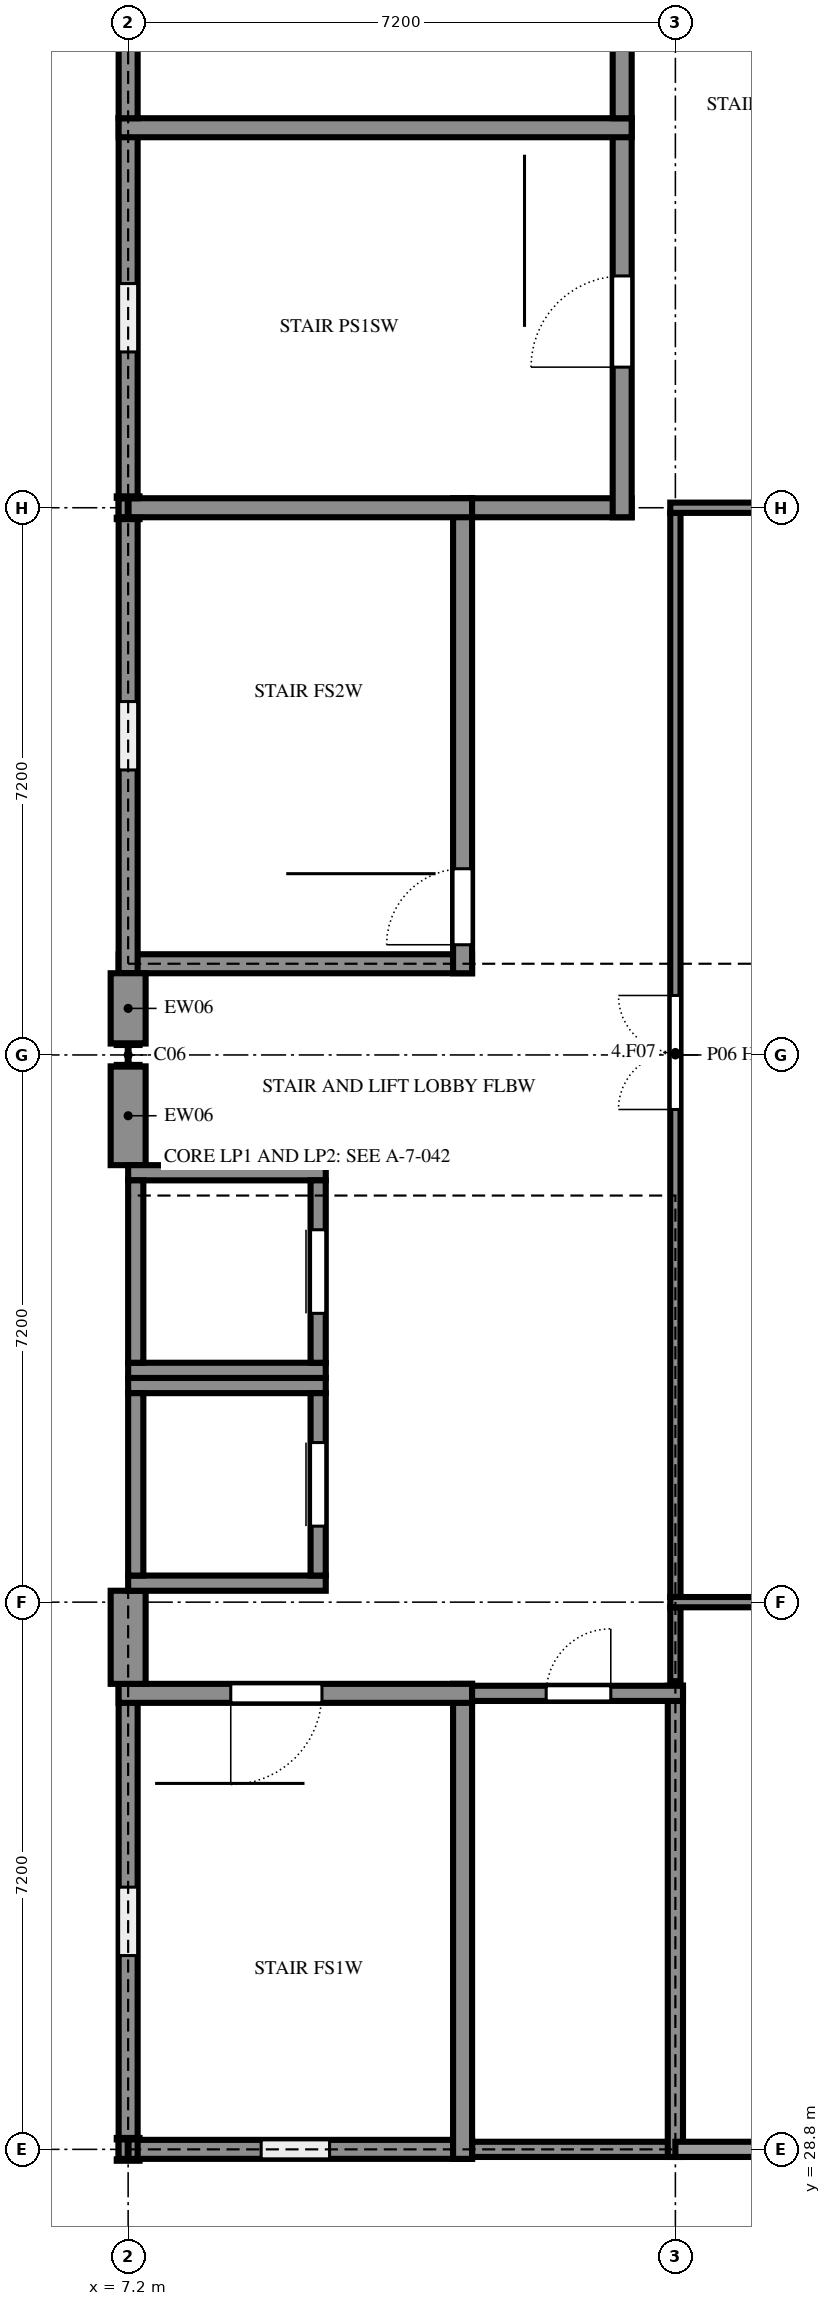
"""IFC4 building model, lengths in metres.
Left out: names, types, materials, properties, quantities, classifications, styles, units other than length and angle.
Written with IfcOpenShell. Run it as: python <this file> out.ifc"""

import sys

from ifc_helpers import new_model, si_unit, direction, frame, frame_2d, origin, origin_2d, place, context, subcontext, project, spatial, rectangle, i_section, extrude, element, fill, save


model = new_model("IFC4")
c1 = context("Model", 3, precision=1e-05, world=origin(), true_north=direction((0.0, 1.0)))
c2 = subcontext(c1, "Body", "Model", "MODEL_VIEW")
j1 = project(units=[si_unit("LENGTHUNIT", "METRE"), si_unit("PLANEANGLEUNIT", "RADIAN")], contexts=[c1])
p1 = place(None, origin())
s1 = spatial("IfcSite", under=j1, at=p1, CompositionType="ELEMENT")
p2 = place(p1, origin())
s2 = spatial("IfcBuilding", under=s1, at=p2, CompositionType="ELEMENT")
p3 = place(p2, frame((0.0, 0.0, 14.4)))
s3 = spatial("IfcBuildingStorey", under=s2, at=p3, CompositionType="ELEMENT", Elevation=14.4)
for number, where, z_axis, x_axis in (
    (1, (7.2, 28.8, 0.0), (0.0, 0.0, 1.0), (1.0, 0.0, 0.0)),
    (2, (7.2, 43.2, 0.0), (0.0, 0.0, 1.0), (1.0, 0.0, 0.0)),
    (3, (7.2, 50.4, 0.0), (0.0, 0.0, 1.0), (1.0, 0.0, 0.0)),
):
    element("IfcColumn", number, at=place(p3, frame(where, z_axis=z_axis, x_axis=x_axis)), inside=s3, PredefinedType="COLUMN", context=c2, shape_type="SweptSolid", body=[
        extrude(i_section(OverallWidth=0.3, OverallDepth=0.3, WebThickness=0.011, FlangeThickness=0.019, FilletRadius=0.027, at=origin_2d()), origin(), (0.0, 0.0, 1.0), 3.6),
    ])
p4 = place(p3, frame((7.075, 28.8, 0.0), z_axis=(0.0, 0.0, 1.0), x_axis=(1.0, 0.0, 0.0)))
e4 = element("IfcWall", 4, at=p4, inside=s3, PredefinedType="SHEAR", context=c2, shape_type="SweptSolid", body=[
    extrude(rectangle(XDim=4.65, YDim=0.25, at=frame_2d((2.325, 0.0))), origin(), (0.0, 0.0, 1.0), 3.6),
])
p5 = place(p4, frame((1.875, 0.0, 0.6)))
e5 = element("IfcOpeningElement", 5, at=p5, cuts=e4, PredefinedType="OPENING", context=c2, shape_type="SweptSolid", body=[
    extrude(rectangle(XDim=0.9, YDim=2.1, at=frame_2d((0.45, 1.05))), frame((0.0, 0.135, 0.0), z_axis=(0.0, -1.0, 0.0), x_axis=(1.0, 0.0, 0.0)), (0.0, 0.0, 1.0), 0.27),
])
p6 = place(p3, frame((11.725, 28.8, 0.0), z_axis=(0.0, 0.0, 1.0), x_axis=(1.0, 0.0, 0.0)))
e6 = element("IfcWall", 6, at=p6, inside=s3, PredefinedType="SHEAR", context=c2, shape_type="SweptSolid", body=[
    extrude(rectangle(XDim=2.775, YDim=0.2, at=frame_2d((1.387, 0.0))), origin(), (0.0, 0.0, 1.0), 3.6),
])
p7 = place(p3, frame((11.6, 28.675, 0.0), z_axis=(0.0, 0.0, 1.0), x_axis=(0.0, 1.0, 0.0)))
e7 = element("IfcWall", 7, at=p7, inside=s3, PredefinedType="SHEAR", context=c2, shape_type="SweptSolid", body=[
    extrude(rectangle(XDim=6.25, YDim=0.25, at=frame_2d((3.125, 0.0))), origin(), (0.0, 0.0, 1.0), 3.6),
])
p8 = place(p3, frame((14.4, 28.7, 0.0), z_axis=(0.0, 0.0, 1.0), x_axis=(0.0, 1.0, 0.0)))
e8 = element("IfcWall", 8, at=p8, inside=s3, PredefinedType="SHEAR", context=c2, shape_type="SweptSolid", body=[
    extrude(rectangle(XDim=6.2, YDim=0.2, at=frame_2d((3.1, 0.0))), origin(), (0.0, 0.0, 1.0), 3.6),
])
p9 = place(p3, frame((7.2, 34.925, 0.0), z_axis=(0.0, 0.0, 1.0), x_axis=(0.0, -1.0, 0.0)))
e9 = element("IfcWall", 9, at=p9, inside=s3, PredefinedType="SHEAR", context=c2, shape_type="SweptSolid", body=[
    extrude(rectangle(XDim=6.25, YDim=0.25, at=frame_2d((3.125, 0.0))), origin(), (0.0, 0.0, 1.0), 3.6),
])
p10 = place(p9, frame((2.675, 0.0, 0.6)))
e10 = element("IfcOpeningElement", 10, at=p10, cuts=e9, PredefinedType="OPENING", context=c2, shape_type="SweptSolid", body=[
    extrude(rectangle(XDim=0.9, YDim=2.1, at=frame_2d((0.45, 1.05))), frame((0.0, 0.135, 0.0), z_axis=(0.0, -1.0, 0.0), x_axis=(1.0, 0.0, 0.0)), (0.0, 0.0, 1.0), 0.27),
])
p11 = place(p3, frame((11.725, 34.8, 0.0), z_axis=(0.0, 0.0, 1.0), x_axis=(-1.0, 0.0, 0.0)))
e11 = element("IfcWall", 11, at=p11, inside=s3, PredefinedType="SHEAR", context=c2, shape_type="SweptSolid", body=[
    extrude(rectangle(XDim=4.65, YDim=0.25, at=frame_2d((2.325, 0.0))), origin(), (0.0, 0.0, 1.0), 3.6),
])
p12 = place(p11, frame((1.975, 0.0, 0.0)))
e12 = element("IfcOpeningElement", 12, at=p12, cuts=e11, PredefinedType="OPENING", context=c2, shape_type="SweptSolid", body=[
    extrude(rectangle(XDim=1.2, YDim=2.4, at=frame_2d((0.6, 1.2))), frame((0.0, 0.135, 0.0), z_axis=(0.0, -1.0, 0.0), x_axis=(1.0, 0.0, 0.0)), (0.0, 0.0, 1.0), 0.27),
])
p13 = place(p3, frame((14.5, 34.8, 0.0), z_axis=(0.0, 0.0, 1.0), x_axis=(-1.0, 0.0, 0.0)))
e13 = element("IfcWall", 13, at=p13, inside=s3, PredefinedType="SHEAR", context=c2, shape_type="SweptSolid", body=[
    extrude(rectangle(XDim=2.775, YDim=0.2, at=frame_2d((1.387, 0.0))), origin(), (0.0, 0.0, 1.0), 3.6),
])
p14 = place(p13, frame((0.95, 0.0, 0.0)))
e14 = element("IfcOpeningElement", 14, at=p14, cuts=e13, PredefinedType="OPENING", context=c2, shape_type="SweptSolid", body=[
    extrude(rectangle(XDim=0.85, YDim=2.1, at=frame_2d((0.425, 1.05))), frame((0.0, 0.11, 0.0), z_axis=(0.0, -1.0, 0.0), x_axis=(1.0, 0.0, 0.0)), (0.0, 0.0, 1.0), 0.22),
])
p15 = place(p3, frame((7.075, 44.4, 0.0), z_axis=(0.0, 0.0, 1.0), x_axis=(1.0, 0.0, 0.0)))
e15 = element("IfcWall", 15, at=p15, inside=s3, PredefinedType="SHEAR", context=c2, shape_type="SweptSolid", body=[
    extrude(rectangle(XDim=4.65, YDim=0.25, at=frame_2d((2.325, 0.0))), origin(), (0.0, 0.0, 1.0), 3.6),
])
p16 = place(p3, frame((11.6, 44.275, 0.0), z_axis=(0.0, 0.0, 1.0), x_axis=(0.0, 1.0, 0.0)))
e16 = element("IfcWall", 16, at=p16, inside=s3, PredefinedType="SHEAR", context=c2, shape_type="SweptSolid", body=[
    extrude(rectangle(XDim=6.25, YDim=0.25, at=frame_2d((3.125, 0.0))), origin(), (0.0, 0.0, 1.0), 3.6),
])
p17 = place(p16, frame((0.375, 0.0, 0.0)))
e17 = element("IfcOpeningElement", 17, at=p17, cuts=e16, PredefinedType="OPENING", context=c2, shape_type="SweptSolid", body=[
    extrude(rectangle(XDim=1.0, YDim=2.4, at=frame_2d((0.5, 1.2))), frame((0.0, 0.135, 0.0), z_axis=(0.0, -1.0, 0.0), x_axis=(1.0, 0.0, 0.0)), (0.0, 0.0, 1.0), 0.27),
])
p18 = place(p3, frame((7.2, 50.525, 0.0), z_axis=(0.0, 0.0, 1.0), x_axis=(0.0, -1.0, 0.0)))
e18 = element("IfcWall", 18, at=p18, inside=s3, PredefinedType="SHEAR", context=c2, shape_type="SweptSolid", body=[
    extrude(rectangle(XDim=6.25, YDim=0.25, at=frame_2d((3.125, 0.0))), origin(), (0.0, 0.0, 1.0), 3.6),
])
p19 = place(p18, frame((2.675, 0.0, 0.6)))
e19 = element("IfcOpeningElement", 19, at=p19, cuts=e18, PredefinedType="OPENING", context=c2, shape_type="SweptSolid", body=[
    extrude(rectangle(XDim=0.9, YDim=2.1, at=frame_2d((0.45, 1.05))), frame((0.0, 0.135, 0.0), z_axis=(0.0, -1.0, 0.0), x_axis=(1.0, 0.0, 0.0)), (0.0, 0.0, 1.0), 0.27),
])
p20 = place(p3, frame((11.725, 50.4, 0.0), z_axis=(0.0, 0.0, 1.0), x_axis=(-1.0, 0.0, 0.0)))
e20 = element("IfcWall", 20, at=p20, inside=s3, PredefinedType="SHEAR", context=c2, shape_type="SweptSolid", body=[
    extrude(rectangle(XDim=4.65, YDim=0.25, at=frame_2d((2.325, 0.0))), origin(), (0.0, 0.0, 1.0), 3.6),
])
p21 = place(p3, frame((11.725, 50.4, 0.0), z_axis=(0.0, 0.0, 1.0), x_axis=(1.0, 0.0, 0.0)))
e21 = element("IfcWall", 21, at=p21, inside=s3, PredefinedType="SHEAR", context=c2, shape_type="SweptSolid", body=[
    extrude(rectangle(XDim=2.1, YDim=0.25, at=frame_2d((1.05, 0.0))), origin(), (0.0, 0.0, 1.0), 3.6),
])
p22 = place(p3, frame((13.7, 50.275, 0.0), z_axis=(0.0, 0.0, 1.0), x_axis=(0.0, 1.0, 0.0)))
e22 = element("IfcWall", 22, at=p22, inside=s3, PredefinedType="SHEAR", context=c2, shape_type="SweptSolid", body=[
    extrude(rectangle(XDim=5.25, YDim=0.25, at=frame_2d((2.625, 0.0))), origin(), (0.0, 0.0, 1.0), 3.6),
])
p23 = place(p22, frame((1.975, 0.0, 0.0)))
e23 = element("IfcOpeningElement", 23, at=p23, cuts=e22, PredefinedType="OPENING", context=c2, shape_type="SweptSolid", body=[
    extrude(rectangle(XDim=1.2, YDim=2.4, at=frame_2d((0.6, 1.2))), frame((0.0, 0.135, 0.0), z_axis=(0.0, -1.0, 0.0), x_axis=(1.0, 0.0, 0.0)), (0.0, 0.0, 1.0), 0.27),
])
p24 = place(p3, frame((7.2, 55.525, 0.0), z_axis=(0.0, 0.0, 1.0), x_axis=(0.0, -1.0, 0.0)))
e24 = element("IfcWall", 24, at=p24, inside=s3, PredefinedType="SHEAR", context=c2, shape_type="SweptSolid", body=[
    extrude(rectangle(XDim=5.0, YDim=0.25, at=frame_2d((2.5, 0.0))), origin(), (0.0, 0.0, 1.0), 3.6),
])
p25 = place(p24, frame((2.175, 0.0, 0.6)))
e25 = element("IfcOpeningElement", 25, at=p25, cuts=e24, PredefinedType="OPENING", context=c2, shape_type="SweptSolid", body=[
    extrude(rectangle(XDim=0.9, YDim=2.1, at=frame_2d((0.45, 1.05))), frame((0.0, 0.135, 0.0), z_axis=(0.0, -1.0, 0.0), x_axis=(1.0, 0.0, 0.0)), (0.0, 0.0, 1.0), 0.27),
])
p26 = place(p3, frame((13.825, 55.4, 0.0), z_axis=(0.0, 0.0, 1.0), x_axis=(-1.0, 0.0, 0.0)))
e26 = element("IfcWall", 26, at=p26, inside=s3, PredefinedType="SHEAR", context=c2, shape_type="SweptSolid", body=[
    extrude(rectangle(XDim=6.75, YDim=0.25, at=frame_2d((3.375, 0.0))), origin(), (0.0, 0.0, 1.0), 3.6),
])
p27 = place(p3, frame((13.7, 55.525, 0.0), z_axis=(0.0, 0.0, 1.0), x_axis=(0.0, 1.0, 0.0)))
e27 = element("IfcWall", 27, at=p27, inside=s3, PredefinedType="SHEAR", context=c2, shape_type="SweptSolid", body=[
    extrude(rectangle(XDim=5.0, YDim=0.25, at=frame_2d((2.5, 0.0))), origin(), (0.0, 0.0, 1.0), 3.6),
])
p28 = place(p3, frame((7.2, 60.525, 0.0), z_axis=(0.0, 0.0, 1.0), x_axis=(0.0, -1.0, 0.0)))
e28 = element("IfcWall", 28, at=p28, inside=s3, PredefinedType="SHEAR", context=c2, shape_type="SweptSolid", body=[
    extrude(rectangle(XDim=5.0, YDim=0.25, at=frame_2d((2.5, 0.0))), origin(), (0.0, 0.0, 1.0), 3.6),
])
p29 = place(p28, frame((2.175, 0.0, 0.6)))
e29 = element("IfcOpeningElement", 29, at=p29, cuts=e28, PredefinedType="OPENING", context=c2, shape_type="SweptSolid", body=[
    extrude(rectangle(XDim=0.9, YDim=2.1, at=frame_2d((0.45, 1.05))), frame((0.0, 0.135, 0.0), z_axis=(0.0, -1.0, 0.0), x_axis=(1.0, 0.0, 0.0)), (0.0, 0.0, 1.0), 0.27),
])
p30 = place(p3, frame((7.2, 44.275, 0.0), z_axis=(0.0, 0.0, 1.0), x_axis=(0.0, -1.0, 0.0)))
e30 = element("IfcWall", 30, at=p30, inside=s3, PredefinedType="SOLIDWALL", context=c2, shape_type="SweptSolid", body=[
    extrude(rectangle(XDim=0.925, YDim=0.46, at=frame_2d((0.462, 0.0))), origin(), (0.0, 0.0, 1.0), 3.22),
])
p31 = place(p3, frame((7.2, 43.05, 0.0), z_axis=(0.0, 0.0, 1.0), x_axis=(0.0, -1.0, 0.0)))
e31 = element("IfcWall", 31, at=p31, inside=s3, PredefinedType="SOLIDWALL", context=c2, shape_type="SweptSolid", body=[
    extrude(rectangle(XDim=1.3, YDim=0.46, at=frame_2d((0.65, 0.0))), origin(), (0.0, 0.0, 1.0), 3.22),
])
p32 = place(p3, frame((7.2, 36.15, 0.0), z_axis=(0.0, 0.0, 1.0), x_axis=(0.0, -1.0, 0.0)))
e32 = element("IfcWall", 32, at=p32, inside=s3, PredefinedType="SOLIDWALL", context=c2, shape_type="SweptSolid", body=[
    extrude(rectangle(XDim=1.225, YDim=0.46, at=frame_2d((0.612, 0.0))), origin(), (0.0, 0.0, 1.0), 3.22),
])
for number, where, z_axis, x_axis in (
    (33, (7.2, 36.25, 0.0), (0.0, 0.0, 1.0), (1.0, 0.0, 0.0)),
    (34, (7.2, 38.85, 0.0), (0.0, 0.0, 1.0), (1.0, 0.0, 0.0)),
):
    element("IfcWall", number, at=place(p3, frame(where, z_axis=z_axis, x_axis=x_axis)), inside=s3, PredefinedType="SHEAR", context=c2, shape_type="SweptSolid", body=[
        extrude(rectangle(XDim=2.6, YDim=0.2, at=frame_2d((1.3, 0.0))), origin(), (0.0, 0.0, 1.0), 4.5),
    ])
p33 = place(p3, frame((7.3, 36.35, 0.0), z_axis=(0.0, 0.0, 1.0), x_axis=(0.0, 1.0, 0.0)))
e35 = element("IfcWall", 35, at=p33, inside=s3, PredefinedType="SHEAR", context=c2, shape_type="SweptSolid", body=[
    extrude(rectangle(XDim=2.4, YDim=0.2, at=frame_2d((1.2, 0.0))), origin(), (0.0, 0.0, 1.0), 4.5),
])
p34 = place(p3, frame((9.7, 36.35, 0.0), z_axis=(0.0, 0.0, 1.0), x_axis=(0.0, 1.0, 0.0)))
e36 = element("IfcWall", 36, at=p34, inside=s3, PredefinedType="SHEAR", context=c2, shape_type="SweptSolid", body=[
    extrude(rectangle(XDim=2.4, YDim=0.2, at=frame_2d((1.2, 0.0))), origin(), (0.0, 0.0, 1.0), 4.5),
])
p35 = place(p34, frame((0.65, 0.0, 0.0)))
e37 = element("IfcOpeningElement", 37, at=p35, cuts=e36, PredefinedType="OPENING", context=c2, shape_type="SweptSolid", body=[
    extrude(rectangle(XDim=1.1, YDim=2.1, at=frame_2d((0.55, 1.05))), frame((0.0, 0.11, 0.0), z_axis=(0.0, -1.0, 0.0), x_axis=(1.0, 0.0, 0.0)), (0.0, 0.0, 1.0), 0.22),
])
for number, where, z_axis, x_axis in (
    (38, (7.2, 39.05, 0.0), (0.0, 0.0, 1.0), (1.0, 0.0, 0.0)),
    (39, (7.2, 41.65, 0.0), (0.0, 0.0, 1.0), (1.0, 0.0, 0.0)),
):
    element("IfcWall", number, at=place(p3, frame(where, z_axis=z_axis, x_axis=x_axis)), inside=s3, PredefinedType="SHEAR", context=c2, shape_type="SweptSolid", body=[
        extrude(rectangle(XDim=2.6, YDim=0.2, at=frame_2d((1.3, 0.0))), origin(), (0.0, 0.0, 1.0), 4.5),
    ])
p36 = place(p3, frame((7.3, 39.15, 0.0), z_axis=(0.0, 0.0, 1.0), x_axis=(0.0, 1.0, 0.0)))
e40 = element("IfcWall", 40, at=p36, inside=s3, PredefinedType="SHEAR", context=c2, shape_type="SweptSolid", body=[
    extrude(rectangle(XDim=2.4, YDim=0.2, at=frame_2d((1.2, 0.0))), origin(), (0.0, 0.0, 1.0), 4.5),
])
p37 = place(p3, frame((9.7, 39.15, 0.0), z_axis=(0.0, 0.0, 1.0), x_axis=(0.0, 1.0, 0.0)))
e41 = element("IfcWall", 41, at=p37, inside=s3, PredefinedType="SHEAR", context=c2, shape_type="SweptSolid", body=[
    extrude(rectangle(XDim=2.4, YDim=0.2, at=frame_2d((1.2, 0.0))), origin(), (0.0, 0.0, 1.0), 4.5),
])
p38 = place(p37, frame((0.65, 0.0, 0.0)))
e42 = element("IfcOpeningElement", 42, at=p38, cuts=e41, PredefinedType="OPENING", context=c2, shape_type="SweptSolid", body=[
    extrude(rectangle(XDim=1.1, YDim=2.1, at=frame_2d((0.55, 1.05))), frame((0.0, 0.11, 0.0), z_axis=(0.0, -1.0, 0.0), x_axis=(1.0, 0.0, 0.0)), (0.0, 0.0, 1.0), 0.22),
])
p39 = place(p3, frame((14.4, 50.333, 0.0), z_axis=(0.0, 0.0, 1.0), x_axis=(0.0, -1.0, 0.0)))
e43 = element("IfcWall", 43, at=p39, inside=s3, PredefinedType="PARTITIONING", context=c2, shape_type="SweptSolid", body=[
    extrude(rectangle(XDim=14.265, YDim=0.135, at=frame_2d((7.133, 0.0))), origin(), (0.0, 0.0, 1.0), 3.12),
])
p40 = place(p39, frame((6.35, 0.0, 0.0)))
e44 = element("IfcOpeningElement", 44, at=p40, cuts=e43, PredefinedType="OPENING", context=c2, shape_type="SweptSolid", body=[
    extrude(rectangle(XDim=1.5, YDim=2.1, at=frame_2d((0.75, 1.05))), frame((0.0, 0.077, 0.0), z_axis=(0.0, -1.0, 0.0), x_axis=(1.0, 0.0, 0.0)), (0.0, 0.0, 1.0), 0.155),
])
p41 = place(p3, frame((14.4, 35.933, 0.0), z_axis=(0.0, 0.0, 1.0), x_axis=(0.0, -1.0, 0.0)))
e45 = element("IfcWall", 45, at=p41, inside=s3, PredefinedType="PARTITIONING", context=c2, shape_type="SweptSolid", body=[
    extrude(rectangle(XDim=0.973, YDim=0.135, at=frame_2d((0.486, 0.0))), origin(), (0.0, 0.0, 1.0), 3.219),
])
p42 = place(p3, frame((18.0, 50.4, 0.0), z_axis=(0.0, 0.0, 1.0), x_axis=(-1.0, 0.0, 0.0)))
e46 = element("IfcWall", 46, at=p42, inside=s3, PredefinedType="PARTITIONING", context=c2, shape_type="SweptSolid", body=[
    extrude(rectangle(XDim=3.667, YDim=0.135, at=frame_2d((1.834, 0.0))), origin(), (0.0, 0.0, 1.0), 3.09),
])
p43 = place(p3, frame((21.6, 36.0, 0.0), z_axis=(0.0, 0.0, 1.0), x_axis=(-1.0, 0.0, 0.0)))
e47 = element("IfcWall", 47, at=p43, inside=s3, PredefinedType="PARTITIONING", context=c2, shape_type="SweptSolid", body=[
    extrude(rectangle(XDim=7.268, YDim=0.135, at=frame_2d((3.634, 0.0))), origin(), (0.0, 0.0, 1.0), 2.82),
])
p44 = place(p5, origin())
e48 = element("IfcWindow", 48, at=p44, inside=s3, PartitioningType="SINGLE_PANEL", PredefinedType="WINDOW", context=c2, shape_type="SweptSolid", body=[
    extrude(rectangle(XDim=0.9, YDim=2.1, at=frame_2d((0.45, 1.05))), frame((0.0, 0.03, 0.0), z_axis=(0.0, -1.0, 0.0), x_axis=(1.0, 0.0, 0.0)), (0.0, 0.0, 1.0), 0.06),
])
fill(e5, e48)
p45 = place(p19, origin())
e49 = element("IfcWindow", 49, at=p45, inside=s3, PartitioningType="SINGLE_PANEL", PredefinedType="WINDOW", context=c2, shape_type="SweptSolid", body=[
    extrude(rectangle(XDim=0.9, YDim=2.1, at=frame_2d((0.45, 1.05))), frame((0.0, 0.03, 0.0), z_axis=(0.0, -1.0, 0.0), x_axis=(1.0, 0.0, 0.0)), (0.0, 0.0, 1.0), 0.06),
])
fill(e19, e49)
p46 = place(p10, origin())
e50 = element("IfcWindow", 50, at=p46, inside=s3, PartitioningType="SINGLE_PANEL", PredefinedType="WINDOW", context=c2, shape_type="SweptSolid", body=[
    extrude(rectangle(XDim=0.9, YDim=2.1, at=frame_2d((0.45, 1.05))), frame((0.0, 0.03, 0.0), z_axis=(0.0, -1.0, 0.0), x_axis=(1.0, 0.0, 0.0)), (0.0, 0.0, 1.0), 0.06),
])
fill(e10, e50)
p47 = place(p25, origin())
e51 = element("IfcWindow", 51, at=p47, inside=s3, PartitioningType="SINGLE_PANEL", PredefinedType="WINDOW", context=c2, shape_type="SweptSolid", body=[
    extrude(rectangle(XDim=0.9, YDim=2.1, at=frame_2d((0.45, 1.05))), frame((0.0, 0.03, 0.0), z_axis=(0.0, -1.0, 0.0), x_axis=(1.0, 0.0, 0.0)), (0.0, 0.0, 1.0), 0.06),
])
fill(e25, e51)
p48 = place(p35, origin())
e52 = element("IfcDoor", 52, at=p48, inside=s3, OperationType="SLIDING_TO_LEFT", PredefinedType="DOOR", context=c2, shape_type="SweptSolid", body=[
    extrude(rectangle(XDim=1.1, YDim=2.1, at=frame_2d((0.55, 1.05))), frame((0.0, 0.025, 0.0), z_axis=(0.0, -1.0, 0.0), x_axis=(1.0, 0.0, 0.0)), (0.0, 0.0, 1.0), 0.05),
])
fill(e37, e52)
p49 = place(p38, origin())
e53 = element("IfcDoor", 53, at=p49, inside=s3, OperationType="SLIDING_TO_LEFT", PredefinedType="DOOR", context=c2, shape_type="SweptSolid", body=[
    extrude(rectangle(XDim=1.1, YDim=2.1, at=frame_2d((0.55, 1.05))), frame((0.0, 0.025, 0.0), z_axis=(0.0, -1.0, 0.0), x_axis=(1.0, 0.0, 0.0)), (0.0, 0.0, 1.0), 0.05),
])
fill(e42, e53)
p50 = place(p12, origin())
e54 = element("IfcDoor", 54, at=p50, inside=s3, OperationType="SINGLE_SWING_LEFT", PredefinedType="DOOR", context=c2, shape_type="SweptSolid", body=[
    extrude(rectangle(XDim=1.2, YDim=2.4, at=frame_2d((0.6, 1.2))), frame((0.0, 0.025, 0.0), z_axis=(0.0, -1.0, 0.0), x_axis=(1.0, 0.0, 0.0)), (0.0, 0.0, 1.0), 0.05),
])
fill(e12, e54)
p51 = place(p17, origin())
e55 = element("IfcDoor", 55, at=p51, inside=s3, OperationType="SINGLE_SWING_RIGHT", PredefinedType="DOOR", context=c2, shape_type="SweptSolid", body=[
    extrude(rectangle(XDim=1.0, YDim=2.4, at=frame_2d((0.5, 1.2))), frame((0.0, 0.025, 0.0), z_axis=(0.0, -1.0, 0.0), x_axis=(1.0, 0.0, 0.0)), (0.0, 0.0, 1.0), 0.05),
])
fill(e17, e55)
p52 = place(p14, frame((0.85, 0.0, 0.0), z_axis=(0.0, 0.0, 1.0), x_axis=(-1.0, 0.0, 0.0)))
e56 = element("IfcDoor", 56, at=p52, inside=s3, OperationType="SINGLE_SWING_LEFT", PredefinedType="DOOR", context=c2, shape_type="SweptSolid", body=[
    extrude(rectangle(XDim=0.85, YDim=2.1, at=frame_2d((0.425, 1.05))), frame((0.0, 0.025, 0.0), z_axis=(0.0, -1.0, 0.0), x_axis=(1.0, 0.0, 0.0)), (0.0, 0.0, 1.0), 0.05),
])
fill(e14, e56)
p53 = place(p23, origin())
e57 = element("IfcDoor", 57, at=p53, inside=s3, OperationType="SINGLE_SWING_RIGHT", PredefinedType="DOOR", context=c2, shape_type="SweptSolid", body=[
    extrude(rectangle(XDim=1.2, YDim=2.4, at=frame_2d((0.6, 1.2))), frame((0.0, 0.025, 0.0), z_axis=(0.0, -1.0, 0.0), x_axis=(1.0, 0.0, 0.0)), (0.0, 0.0, 1.0), 0.05),
])
fill(e23, e57)
p54 = place(p40, frame((1.5, 0.0, 0.0), z_axis=(0.0, 0.0, 1.0), x_axis=(-1.0, 0.0, 0.0)))
e58 = element("IfcDoor", 58, at=p54, inside=s3, OperationType="DOUBLE_DOOR_SINGLE_SWING", PredefinedType="DOOR", context=c2, shape_type="SweptSolid", body=[
    extrude(rectangle(XDim=1.5, YDim=2.1, at=frame_2d((0.75, 1.05))), frame((0.0, 0.025, 0.0), z_axis=(0.0, -1.0, 0.0), x_axis=(1.0, 0.0, 0.0)), (0.0, 0.0, 1.0), 0.05),
])
fill(e44, e58)
save(model, sys.argv[1])
